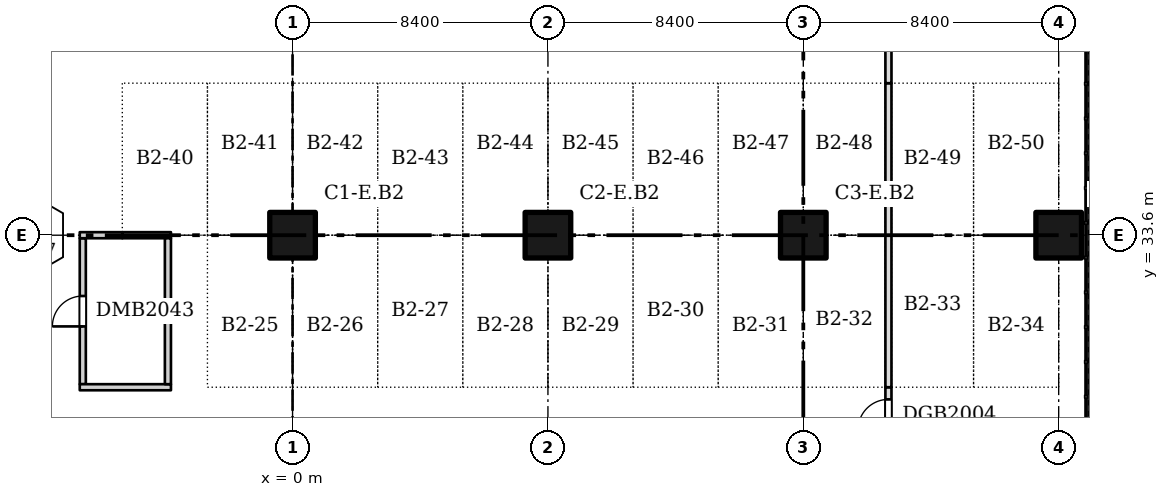
"""IFC4 building model, lengths in metres.
Left out: names, types, materials, properties, quantities, classifications, styles, units other than length and angle.
Written with IfcOpenShell. Run it as: python <this file> out.ifc"""

import sys

from ifc_helpers import new_model, si_unit, direction, frame, frame_2d, origin, origin_2d, place, context, subcontext, project, spatial, rectangle, extrude, element, fill, save


model = new_model("IFC4")
c1 = context("Model", 3, precision=1e-05, world=origin(), true_north=direction((0.0, 1.0)))
c2 = subcontext(c1, "Body", "Model", "MODEL_VIEW")
j1 = project(units=[si_unit("LENGTHUNIT", "METRE"), si_unit("PLANEANGLEUNIT", "RADIAN")], contexts=[c1])
p1 = place(None, origin())
s1 = spatial("IfcSite", under=j1, at=p1, CompositionType="ELEMENT")
p2 = place(p1, origin())
s2 = spatial("IfcBuilding", under=s1, at=p2, CompositionType="ELEMENT")
p3 = place(p2, frame((0.0, 0.0, -8.0)))
s3 = spatial("IfcBuildingStorey", under=s2, at=p3, CompositionType="ELEMENT", Elevation=-8.0)
for number, where, z_axis, x_axis in (
    (1, (0.0, 33.6, 0.0), (0.0, 0.0, 1.0), (1.0, 0.0, 0.0)),
    (2, (8.4, 33.6, 0.0), (0.0, 0.0, 1.0), (1.0, 0.0, 0.0)),
    (3, (16.8, 33.6, 0.0), (0.0, 0.0, 1.0), (1.0, 0.0, 0.0)),
    (4, (25.2, 33.6, 0.0), (0.0, 0.0, 1.0), (1.0, 0.0, 0.0)),
):
    element("IfcColumn", number, at=place(p3, frame(where, z_axis=z_axis, x_axis=x_axis)), inside=s3, PredefinedType="COLUMN", context=c2, shape_type="SweptSolid", body=[
        extrude(rectangle(XDim=1.5, YDim=1.5, at=origin_2d()), origin(), (0.0, 0.0, 1.0), 3.7),
    ])
p4 = place(p3, frame((-6.9, 28.7, 0.0), z_axis=(0.0, 0.0, 1.0), x_axis=(0.0, 1.0, 0.0)))
e5 = element("IfcWall", 5, at=p4, inside=s3, PredefinedType="PARTITIONING", context=c2, shape_type="SweptSolid", body=[
    extrude(rectangle(XDim=4.8, YDim=0.2, at=frame_2d((2.4, 0.0))), origin(), (0.0, 0.0, 1.0), 3.7),
])
p5 = place(p4, frame((1.9, 0.0, 0.0)))
e6 = element("IfcOpeningElement", 6, at=p5, cuts=e5, PredefinedType="OPENING", context=c2, shape_type="SweptSolid", body=[
    extrude(rectangle(XDim=1.0, YDim=2.1, at=frame_2d((0.5, 1.05))), frame((0.0, 0.11, 0.0), z_axis=(0.0, -1.0, 0.0), x_axis=(1.0, 0.0, 0.0)), (0.0, 0.0, 1.0), 0.22),
])
p6 = place(p3, frame((-7.0, 28.6, 0.0), z_axis=(0.0, 0.0, 1.0), x_axis=(1.0, 0.0, 0.0)))
e7 = element("IfcWall", 7, at=p6, inside=s3, PredefinedType="PARTITIONING", context=c2, shape_type="SweptSolid", body=[
    extrude(rectangle(XDim=3.0, YDim=0.2, at=frame_2d((1.5, 0.0))), origin(), (0.0, 0.0, 1.0), 3.7),
])
p7 = place(p3, frame((-7.0, 33.6, 0.0), z_axis=(0.0, 0.0, 1.0), x_axis=(1.0, 0.0, 0.0)))
e8 = element("IfcWall", 8, at=p7, inside=s3, PredefinedType="PARTITIONING", context=c2, shape_type="SweptSolid", body=[
    extrude(rectangle(XDim=1.4, YDim=0.2, at=frame_2d((0.7, 0.0))), origin(), (0.0, 0.0, 1.0), 3.7),
])
p8 = place(p3, frame((-5.6, 33.6, 0.0), z_axis=(0.0, 0.0, 1.0), x_axis=(1.0, 0.0, 0.0)))
e9 = element("IfcWall", 9, at=p8, inside=s3, PredefinedType="PARTITIONING", context=c2, shape_type="SweptSolid", body=[
    extrude(rectangle(XDim=1.6, YDim=0.2, at=frame_2d((0.8, 0.0))), origin(), (0.0, 0.0, 1.0), 3.7),
])
p9 = place(p3, frame((-4.1, 28.7, 0.0), z_axis=(0.0, 0.0, 1.0), x_axis=(0.0, 1.0, 0.0)))
e10 = element("IfcWall", 10, at=p9, inside=s3, PredefinedType="PARTITIONING", context=c2, shape_type="SweptSolid", body=[
    extrude(rectangle(XDim=4.8, YDim=0.2, at=frame_2d((2.4, 0.0))), origin(), (0.0, 0.0, 1.0), 3.7),
])
p10 = place(p3, frame((19.6, 21.8, 0.0), z_axis=(0.0, 0.0, 1.0), x_axis=(0.0, 1.0, 0.0)))
e11 = element("IfcWall", 11, at=p10, inside=s3, PredefinedType="PARTITIONING", context=c2, shape_type="SweptSolid", body=[
    extrude(rectangle(XDim=6.8, YDim=0.2, at=frame_2d((3.4, 0.0))), origin(), (0.0, 0.0, 1.0), 3.7),
])
p11 = place(p10, frame((0.3, 0.0, 0.0)))
e12 = element("IfcOpeningElement", 12, at=p11, cuts=e11, PredefinedType="OPENING", context=c2, shape_type="SweptSolid", body=[
    extrude(rectangle(XDim=4.8, YDim=2.4, at=frame_2d((2.4, 1.2))), frame((0.0, 0.11, 0.0), z_axis=(0.0, -1.0, 0.0), x_axis=(1.0, 0.0, 0.0)), (0.0, 0.0, 1.0), 0.22),
])
p12 = place(p10, frame((5.4, 0.0, 0.0)))
e13 = element("IfcOpeningElement", 13, at=p12, cuts=e11, PredefinedType="OPENING", context=c2, shape_type="SweptSolid", body=[
    extrude(rectangle(XDim=1.0, YDim=2.1, at=frame_2d((0.5, 1.05))), frame((0.0, 0.11, 0.0), z_axis=(0.0, -1.0, 0.0), x_axis=(1.0, 0.0, 0.0)), (0.0, 0.0, 1.0), 0.22),
])
p13 = place(p3, frame((19.6, 28.6, 0.0), z_axis=(0.0, 0.0, 1.0), x_axis=(0.0, 1.0, 0.0)))
e14 = element("IfcWall", 14, at=p13, inside=s3, PredefinedType="PARTITIONING", context=c2, shape_type="SweptSolid", body=[
    extrude(rectangle(XDim=10.0, YDim=0.2, at=frame_2d((5.0, 0.0))), origin(), (0.0, 0.0, 1.0), 3.7),
])
p14 = place(p3, frame((19.6, 38.6, 0.0), z_axis=(0.0, 0.0, 1.0), x_axis=(0.0, 1.0, 0.0)))
e15 = element("IfcWall", 15, at=p14, inside=s3, PredefinedType="PARTITIONING", context=c2, shape_type="SweptSolid", body=[
    extrude(rectangle(XDim=3.4, YDim=0.2, at=frame_2d((1.7, 0.0))), origin(), (0.0, 0.0, 1.0), 3.7),
])
p15 = place(p5, origin())
e16 = element("IfcDoor", 16, at=p15, inside=s3, OperationType="SINGLE_SWING_LEFT", PredefinedType="DOOR", context=c2, shape_type="SweptSolid", body=[
    extrude(rectangle(XDim=1.0, YDim=2.1, at=frame_2d((0.5, 1.05))), frame((0.0, 0.025, 0.0), z_axis=(0.0, -1.0, 0.0), x_axis=(1.0, 0.0, 0.0)), (0.0, 0.0, 1.0), 0.05),
])
fill(e6, e16)
p16 = place(p12, origin())
e17 = element("IfcDoor", 17, at=p16, inside=s3, OperationType="SINGLE_SWING_LEFT", PredefinedType="DOOR", context=c2, shape_type="SweptSolid", body=[
    extrude(rectangle(XDim=1.0, YDim=2.1, at=frame_2d((0.5, 1.05))), frame((0.0, 0.025, 0.0), z_axis=(0.0, -1.0, 0.0), x_axis=(1.0, 0.0, 0.0)), (0.0, 0.0, 1.0), 0.05),
])
fill(e13, e17)
save(model, sys.argv[1])
